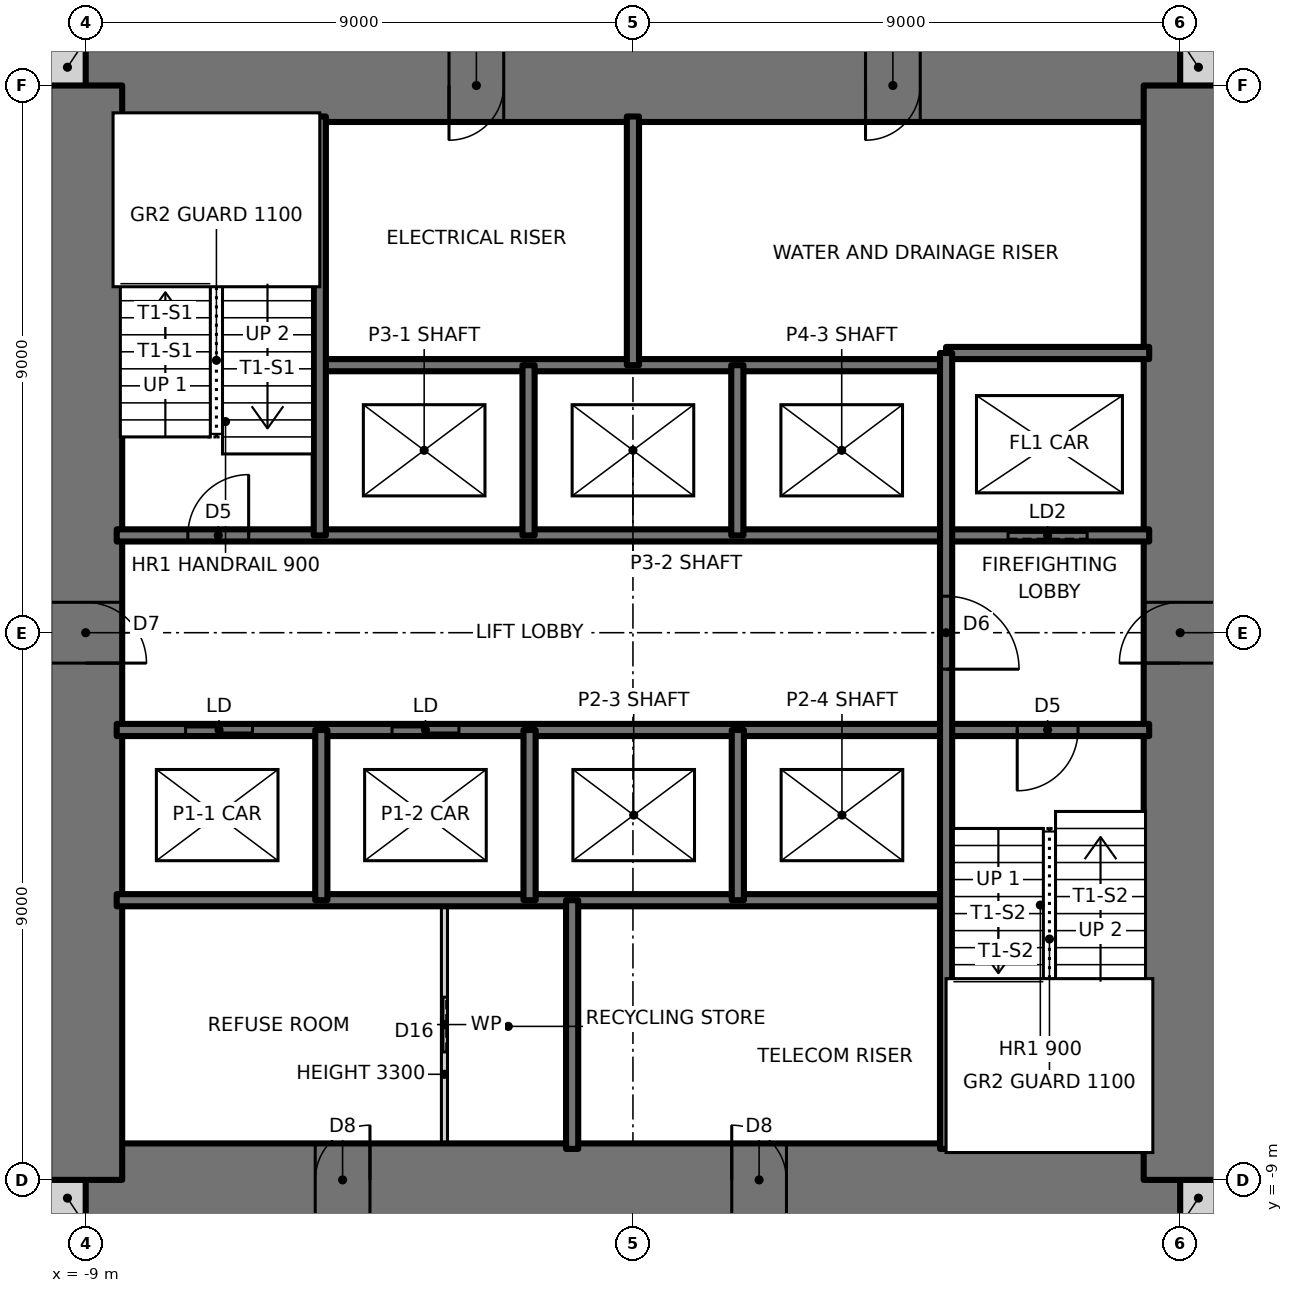
"""IFC4 building model, lengths in metres.
Left out: names, types, materials, properties, quantities, classifications, styles, units other than length and angle.
Written with IfcOpenShell. Run it as: python <this file> out.ifc"""

import sys

from ifc_helpers import new_model, si_unit, direction, frame, frame_2d, origin, place, context, subcontext, project, spatial, rectangle, extrude, element, fill, save


model = new_model("IFC4")
c1 = context("Model", 3, precision=1e-05, world=origin(), true_north=direction((0.0, 1.0)))
c2 = subcontext(c1, "Body", "Model", "MODEL_VIEW")
j1 = project(units=[si_unit("LENGTHUNIT", "METRE"), si_unit("PLANEANGLEUNIT", "RADIAN")], contexts=[c1])
p1 = place(None, origin())
s1 = spatial("IfcSite", under=j1, at=p1, CompositionType="ELEMENT")
p2 = place(p1, origin())
s2 = spatial("IfcBuilding", under=s1, at=p2, CompositionType="ELEMENT")
p3 = place(p2, frame((0.0, 0.0, 53.5)))
s3 = spatial("IfcBuildingStorey", under=s2, at=p3, CompositionType="ELEMENT", Elevation=53.5)
for number, where, z_axis, x_axis in (
    (1, (-9.6, -9.3, 0.0), (0.0, 0.0, 1.0), (1.0, 0.0, 0.0)),
    (2, (9.0, -9.3, 0.0), (0.0, 0.0, 1.0), (1.0, 0.0, 0.0)),
    (3, (9.0, 9.3, 0.0), (0.0, 0.0, 1.0), (1.0, 0.0, 0.0)),
    (4, (-9.6, 9.3, 0.0), (0.0, 0.0, 1.0), (1.0, 0.0, 0.0)),
):
    element("IfcWall", number, at=place(p3, frame(where, z_axis=z_axis, x_axis=x_axis)), inside=s3, PredefinedType="SOLIDWALL", context=c2, shape_type="SweptSolid", body=[
        extrude(rectangle(XDim=0.6, YDim=0.6, at=frame_2d((0.3, 0.0))), origin(), (0.0, 0.0, 1.0), 3.5),
    ])
p4 = place(p3, frame((-9.0, -9.0, 0.0), z_axis=(0.0, 0.0, 1.0), x_axis=(1.0, 0.0, 0.0)))
e5 = element("IfcWall", 5, at=p4, inside=s3, PredefinedType="SHEAR", context=c2, shape_type="SweptSolid", body=[
    extrude(rectangle(XDim=18.0, YDim=1.2, at=frame_2d((9.0, 0.0))), origin(), (0.0, 0.0, 1.0), 3.5),
])
p5 = place(p4, frame((3.775, 0.0, 0.0)))
e6 = element("IfcOpeningElement", 6, at=p5, cuts=e5, PredefinedType="OPENING", context=c2, shape_type="SweptSolid", body=[
    extrude(rectangle(XDim=0.9, YDim=2.1, at=frame_2d((0.45, 1.05))), frame((0.0, 0.61, 0.0), z_axis=(0.0, -1.0, 0.0), x_axis=(1.0, 0.0, 0.0)), (0.0, 0.0, 1.0), 1.22),
])
p6 = place(p4, frame((10.625, 0.0, 0.0)))
e7 = element("IfcOpeningElement", 7, at=p6, cuts=e5, PredefinedType="OPENING", context=c2, shape_type="SweptSolid", body=[
    extrude(rectangle(XDim=0.9, YDim=2.1, at=frame_2d((0.45, 1.05))), frame((0.0, 0.61, 0.0), z_axis=(0.0, -1.0, 0.0), x_axis=(1.0, 0.0, 0.0)), (0.0, 0.0, 1.0), 1.22),
])
p7 = place(p3, frame((9.0, 9.0, 0.0), z_axis=(0.0, 0.0, 1.0), x_axis=(-1.0, 0.0, 0.0)))
e8 = element("IfcWall", 8, at=p7, inside=s3, PredefinedType="SHEAR", context=c2, shape_type="SweptSolid", body=[
    extrude(rectangle(XDim=18.0, YDim=1.2, at=frame_2d((9.0, 0.0))), origin(), (0.0, 0.0, 1.0), 3.5),
])
p8 = place(p7, frame((11.125, 0.0, 0.0)))
e9 = element("IfcOpeningElement", 9, at=p8, cuts=e8, PredefinedType="OPENING", context=c2, shape_type="SweptSolid", body=[
    extrude(rectangle(XDim=0.9, YDim=2.1, at=frame_2d((0.45, 1.05))), frame((0.0, 0.61, 0.0), z_axis=(0.0, -1.0, 0.0), x_axis=(1.0, 0.0, 0.0)), (0.0, 0.0, 1.0), 1.22),
])
p9 = place(p7, frame((4.275, 0.0, 0.0)))
e10 = element("IfcOpeningElement", 10, at=p9, cuts=e8, PredefinedType="OPENING", context=c2, shape_type="SweptSolid", body=[
    extrude(rectangle(XDim=0.9, YDim=2.1, at=frame_2d((0.45, 1.05))), frame((0.0, 0.61, 0.0), z_axis=(0.0, -1.0, 0.0), x_axis=(1.0, 0.0, 0.0)), (0.0, 0.0, 1.0), 1.22),
])
p10 = place(p3, frame((9.0, -9.0, 0.0), z_axis=(0.0, 0.0, 1.0), x_axis=(0.0, 1.0, 0.0)))
e11 = element("IfcWall", 11, at=p10, inside=s3, PredefinedType="SHEAR", context=c2, shape_type="SweptSolid", body=[
    extrude(rectangle(XDim=18.0, YDim=1.2, at=frame_2d((9.0, 0.0))), origin(), (0.0, 0.0, 1.0), 3.5),
])
p11 = place(p10, frame((8.5, 0.0, 0.0)))
e12 = element("IfcOpeningElement", 12, at=p11, cuts=e11, PredefinedType="OPENING", context=c2, shape_type="SweptSolid", body=[
    extrude(rectangle(XDim=1.0, YDim=2.1, at=frame_2d((0.5, 1.05))), frame((0.0, 0.61, 0.0), z_axis=(0.0, -1.0, 0.0), x_axis=(1.0, 0.0, 0.0)), (0.0, 0.0, 1.0), 1.22),
])
p12 = place(p3, frame((-9.0, 9.0, 0.0), z_axis=(0.0, 0.0, 1.0), x_axis=(0.0, -1.0, 0.0)))
e13 = element("IfcWall", 13, at=p12, inside=s3, PredefinedType="SHEAR", context=c2, shape_type="SweptSolid", body=[
    extrude(rectangle(XDim=18.0, YDim=1.2, at=frame_2d((9.0, 0.0))), origin(), (0.0, 0.0, 1.0), 3.5),
])
p13 = place(p12, frame((8.5, 0.0, 0.0)))
e14 = element("IfcOpeningElement", 14, at=p13, cuts=e13, PredefinedType="OPENING", context=c2, shape_type="SweptSolid", body=[
    extrude(rectangle(XDim=1.0, YDim=2.1, at=frame_2d((0.5, 1.05))), frame((0.0, 0.61, 0.0), z_axis=(0.0, -1.0, 0.0), x_axis=(1.0, 0.0, 0.0)), (0.0, 0.0, 1.0), 1.22),
])
p14 = place(p3, frame((-8.49, -4.4, 0.0), z_axis=(0.0, 0.0, 1.0), x_axis=(1.0, 0.0, 0.0)))
e15 = element("IfcWall", 15, at=p14, inside=s3, PredefinedType="SOLIDWALL", context=c2, shape_type="SweptSolid", body=[
    extrude(rectangle(XDim=13.64, YDim=0.2, at=frame_2d((6.82, 0.0))), origin(), (0.0, 0.0, 1.0), 3.5),
])
p15 = place(p3, frame((-8.49, -1.6, 0.0), z_axis=(0.0, 0.0, 1.0), x_axis=(1.0, 0.0, 0.0)))
e16 = element("IfcWall", 16, at=p15, inside=s3, PredefinedType="SOLIDWALL", context=c2, shape_type="SweptSolid", body=[
    extrude(rectangle(XDim=16.98, YDim=0.2, at=frame_2d((8.49, 0.0))), origin(), (0.0, 0.0, 1.0), 3.5),
])
p16 = place(p15, frame((14.81, 0.0, 0.0)))
e17 = element("IfcOpeningElement", 17, at=p16, cuts=e16, PredefinedType="OPENING", context=c2, shape_type="SweptSolid", body=[
    extrude(rectangle(XDim=1.0, YDim=2.1, at=frame_2d((0.5, 1.05))), frame((0.0, 0.11, 0.0), z_axis=(0.0, -1.0, 0.0), x_axis=(1.0, 0.0, 0.0)), (0.0, 0.0, 1.0), 0.22),
])
p17 = place(p15, frame((1.133, 0.0, 0.0)))
e18 = element("IfcOpeningElement", 18, at=p17, cuts=e16, PredefinedType="OPENING", context=c2, shape_type="SweptSolid", body=[
    extrude(rectangle(XDim=1.1, YDim=2.1, at=frame_2d((0.55, 1.05))), frame((0.0, 0.11, 0.0), z_axis=(0.0, -1.0, 0.0), x_axis=(1.0, 0.0, 0.0)), (0.0, 0.0, 1.0), 0.22),
])
p18 = place(p15, frame((4.528, 0.0, 0.0)))
e19 = element("IfcOpeningElement", 19, at=p18, cuts=e16, PredefinedType="OPENING", context=c2, shape_type="SweptSolid", body=[
    extrude(rectangle(XDim=1.1, YDim=2.1, at=frame_2d((0.55, 1.05))), frame((0.0, 0.11, 0.0), z_axis=(0.0, -1.0, 0.0), x_axis=(1.0, 0.0, 0.0)), (0.0, 0.0, 1.0), 0.22),
])
p19 = place(p3, frame((-8.49, 1.6, 0.0), z_axis=(0.0, 0.0, 1.0), x_axis=(1.0, 0.0, 0.0)))
e20 = element("IfcWall", 20, at=p19, inside=s3, PredefinedType="SOLIDWALL", context=c2, shape_type="SweptSolid", body=[
    extrude(rectangle(XDim=16.98, YDim=0.2, at=frame_2d((8.49, 0.0))), origin(), (0.0, 0.0, 1.0), 3.5),
])
p20 = place(p19, frame((1.17, 0.0, 0.0)))
e21 = element("IfcOpeningElement", 21, at=p20, cuts=e20, PredefinedType="OPENING", context=c2, shape_type="SweptSolid", body=[
    extrude(rectangle(XDim=1.0, YDim=2.1, at=frame_2d((0.5, 1.05))), frame((0.0, 0.11, 0.0), z_axis=(0.0, -1.0, 0.0), x_axis=(1.0, 0.0, 0.0)), (0.0, 0.0, 1.0), 0.22),
])
p21 = place(p19, frame((14.66, 0.0, 0.0)))
e22 = element("IfcOpeningElement", 22, at=p21, cuts=e20, PredefinedType="OPENING", context=c2, shape_type="SweptSolid", body=[
    extrude(rectangle(XDim=1.3, YDim=2.1, at=frame_2d((0.65, 1.05))), frame((0.0, 0.11, 0.0), z_axis=(0.0, -1.0, 0.0), x_axis=(1.0, 0.0, 0.0)), (0.0, 0.0, 1.0), 0.22),
])
p22 = place(p3, frame((-5.15, 4.4, 0.0), z_axis=(0.0, 0.0, 1.0), x_axis=(1.0, 0.0, 0.0)))
e23 = element("IfcWall", 23, at=p22, inside=s3, PredefinedType="SOLIDWALL", context=c2, shape_type="SweptSolid", body=[
    extrude(rectangle(XDim=10.3, YDim=0.2, at=frame_2d((5.15, 0.0))), origin(), (0.0, 0.0, 1.0), 3.5),
])
p23 = place(p3, frame((5.15, 4.6, 0.0), z_axis=(0.0, 0.0, 1.0), x_axis=(1.0, 0.0, 0.0)))
e24 = element("IfcWall", 24, at=p23, inside=s3, PredefinedType="SOLIDWALL", context=c2, shape_type="SweptSolid", body=[
    extrude(rectangle(XDim=3.34, YDim=0.2, at=frame_2d((1.67, 0.0))), origin(), (0.0, 0.0, 1.0), 3.5),
])
p24 = place(p3, frame((5.15, -8.49, 0.0), z_axis=(0.0, 0.0, 1.0), x_axis=(0.0, 1.0, 0.0)))
e25 = element("IfcWall", 25, at=p24, inside=s3, PredefinedType="SOLIDWALL", context=c2, shape_type="SweptSolid", body=[
    extrude(rectangle(XDim=13.09, YDim=0.2, at=frame_2d((6.545, 0.0))), origin(), (0.0, 0.0, 1.0), 3.5),
])
p25 = place(p24, frame((7.89, 0.0, 0.0)))
e26 = element("IfcOpeningElement", 26, at=p25, cuts=e25, PredefinedType="OPENING", context=c2, shape_type="SweptSolid", body=[
    extrude(rectangle(XDim=1.2, YDim=2.1, at=frame_2d((0.6, 1.05))), frame((0.0, 0.11, 0.0), z_axis=(0.0, -1.0, 0.0), x_axis=(1.0, 0.0, 0.0)), (0.0, 0.0, 1.0), 0.22),
])
for number, where, z_axis, x_axis in (
    (27, (1.725, -4.4, 0.0), (0.0, 0.0, 1.0), (0.0, 1.0, 0.0)),
    (28, (1.717, 1.6, 0.0), (0.0, 0.0, 1.0), (0.0, 1.0, 0.0)),
):
    element("IfcWall", number, at=place(p3, frame(where, z_axis=z_axis, x_axis=x_axis)), inside=s3, PredefinedType="SOLIDWALL", context=c2, shape_type="SweptSolid", body=[
        extrude(rectangle(XDim=2.8, YDim=0.2, at=frame_2d((1.4, 0.0))), origin(), (0.0, 0.0, 1.0), 3.5),
    ])
for number, where, z_axis, x_axis in (
    (29, (0.0, 4.4, 0.0), (0.0, 0.0, 1.0), (0.0, 1.0, 0.0)),
    (30, (-1.0, -8.49, 0.0), (0.0, 0.0, 1.0), (0.0, 1.0, 0.0)),
):
    element("IfcWall", number, at=place(p3, frame(where, z_axis=z_axis, x_axis=x_axis)), inside=s3, PredefinedType="SOLIDWALL", context=c2, shape_type="SweptSolid", body=[
        extrude(rectangle(XDim=4.09, YDim=0.2, at=frame_2d((2.045, 0.0))), origin(), (0.0, 0.0, 1.0), 3.5),
    ])
for number, where, z_axis, x_axis in (
    (31, (-1.7, -4.4, 0.0), (0.0, 0.0, 1.0), (0.0, 1.0, 0.0)),
    (32, (-1.717, 1.6, 0.0), (0.0, 0.0, 1.0), (0.0, 1.0, 0.0)),
):
    element("IfcWall", number, at=place(p3, frame(where, z_axis=z_axis, x_axis=x_axis)), inside=s3, PredefinedType="SOLIDWALL", context=c2, shape_type="SweptSolid", body=[
        extrude(rectangle(XDim=2.8, YDim=0.2, at=frame_2d((1.4, 0.0))), origin(), (0.0, 0.0, 1.0), 3.5),
    ])
p26 = place(p3, frame((-3.1, -8.49, 0.0), z_axis=(0.0, 0.0, 1.0), x_axis=(0.0, 1.0, 0.0)))
e33 = element("IfcWall", 33, at=p26, inside=s3, PredefinedType="PARTITIONING", context=c2, shape_type="SweptSolid", body=[
    extrude(rectangle(XDim=4.09, YDim=0.1, at=frame_2d((2.045, 0.0))), origin(), (0.0, 0.0, 1.0), 3.3),
])
p27 = place(p26, frame((1.595, 0.0, 0.0)))
e34 = element("IfcOpeningElement", 34, at=p27, cuts=e33, PredefinedType="OPENING", context=c2, shape_type="SweptSolid", body=[
    extrude(rectangle(XDim=0.9, YDim=2.1, at=frame_2d((0.45, 1.05))), frame((0.0, 0.06, 0.0), z_axis=(0.0, -1.0, 0.0), x_axis=(1.0, 0.0, 0.0)), (0.0, 0.0, 1.0), 0.12),
])
p28 = place(p3, frame((-5.125, -4.4, 0.0), z_axis=(0.0, 0.0, 1.0), x_axis=(0.0, 1.0, 0.0)))
e35 = element("IfcWall", 35, at=p28, inside=s3, PredefinedType="SOLIDWALL", context=c2, shape_type="SweptSolid", body=[
    extrude(rectangle(XDim=2.8, YDim=0.2, at=frame_2d((1.4, 0.0))), origin(), (0.0, 0.0, 1.0), 3.5),
])
p29 = place(p3, frame((-5.15, 1.6, 0.0), z_axis=(0.0, 0.0, 1.0), x_axis=(0.0, 1.0, 0.0)))
e36 = element("IfcWall", 36, at=p29, inside=s3, PredefinedType="SOLIDWALL", context=c2, shape_type="SweptSolid", body=[
    extrude(rectangle(XDim=6.89, YDim=0.2, at=frame_2d((3.445, 0.0))), origin(), (0.0, 0.0, 1.0), 3.5),
])
p30 = place(p20, origin())
e37 = element("IfcDoor", 37, at=p30, inside=s3, OperationType="SINGLE_SWING_RIGHT", PredefinedType="DOOR", context=c2, shape_type="SweptSolid", body=[
    extrude(rectangle(XDim=1.0, YDim=2.1, at=frame_2d((0.5, 1.05))), frame((0.0, 0.025, 0.0), z_axis=(0.0, -1.0, 0.0), x_axis=(1.0, 0.0, 0.0)), (0.0, 0.0, 1.0), 0.05),
])
fill(e21, e37)
p31 = place(p16, frame((1.0, 0.0, 0.0), z_axis=(0.0, 0.0, 1.0), x_axis=(-1.0, 0.0, 0.0)))
e38 = element("IfcDoor", 38, at=p31, inside=s3, OperationType="SINGLE_SWING_RIGHT", PredefinedType="DOOR", context=c2, shape_type="SweptSolid", body=[
    extrude(rectangle(XDim=1.0, YDim=2.1, at=frame_2d((0.5, 1.05))), frame((0.0, 0.025, 0.0), z_axis=(0.0, -1.0, 0.0), x_axis=(1.0, 0.0, 0.0)), (0.0, 0.0, 1.0), 0.05),
])
fill(e17, e38)
p32 = place(p25, frame((1.2, 0.0, 0.0), z_axis=(0.0, 0.0, 1.0), x_axis=(-1.0, 0.0, 0.0)))
e39 = element("IfcDoor", 39, at=p32, inside=s3, OperationType="SINGLE_SWING_RIGHT", PredefinedType="DOOR", context=c2, shape_type="SweptSolid", body=[
    extrude(rectangle(XDim=1.2, YDim=2.1, at=frame_2d((0.6, 1.05))), frame((0.0, 0.025, 0.0), z_axis=(0.0, -1.0, 0.0), x_axis=(1.0, 0.0, 0.0)), (0.0, 0.0, 1.0), 0.05),
])
fill(e26, e39)
p33 = place(p27, origin())
e40 = element("IfcDoor", 40, at=p33, inside=s3, OperationType="SLIDING_TO_LEFT", PredefinedType="DOOR", context=c2, shape_type="SweptSolid", body=[
    extrude(rectangle(XDim=0.9, YDim=2.1, at=frame_2d((0.45, 1.05))), frame((0.0, 0.025, 0.0), z_axis=(0.0, -1.0, 0.0), x_axis=(1.0, 0.0, 0.0)), (0.0, 0.0, 1.0), 0.05),
])
fill(e34, e40)
p34 = place(p13, origin())
e41 = element("IfcDoor", 41, at=p34, inside=s3, OperationType="SINGLE_SWING_RIGHT", PredefinedType="DOOR", context=c2, shape_type="SweptSolid", body=[
    extrude(rectangle(XDim=1.0, YDim=2.1, at=frame_2d((0.5, 1.05))), frame((0.0, 0.025, 0.0), z_axis=(0.0, -1.0, 0.0), x_axis=(1.0, 0.0, 0.0)), (0.0, 0.0, 1.0), 0.05),
])
fill(e14, e41)
p35 = place(p11, origin())
e42 = element("IfcDoor", 42, at=p35, inside=s3, OperationType="SINGLE_SWING_LEFT", PredefinedType="DOOR", context=c2, shape_type="SweptSolid", body=[
    extrude(rectangle(XDim=1.0, YDim=2.1, at=frame_2d((0.5, 1.05))), frame((0.0, 0.025, 0.0), z_axis=(0.0, -1.0, 0.0), x_axis=(1.0, 0.0, 0.0)), (0.0, 0.0, 1.0), 0.05),
])
fill(e12, e42)
p36 = place(p8, origin())
e43 = element("IfcDoor", 43, at=p36, inside=s3, OperationType="SINGLE_SWING_RIGHT", PredefinedType="DOOR", context=c2, shape_type="SweptSolid", body=[
    extrude(rectangle(XDim=0.9, YDim=2.1, at=frame_2d((0.45, 1.05))), frame((0.0, 0.025, 0.0), z_axis=(0.0, -1.0, 0.0), x_axis=(1.0, 0.0, 0.0)), (0.0, 0.0, 1.0), 0.05),
])
fill(e9, e43)
p37 = place(p9, origin())
e44 = element("IfcDoor", 44, at=p37, inside=s3, OperationType="SINGLE_SWING_RIGHT", PredefinedType="DOOR", context=c2, shape_type="SweptSolid", body=[
    extrude(rectangle(XDim=0.9, YDim=2.1, at=frame_2d((0.45, 1.05))), frame((0.0, 0.025, 0.0), z_axis=(0.0, -1.0, 0.0), x_axis=(1.0, 0.0, 0.0)), (0.0, 0.0, 1.0), 0.05),
])
fill(e10, e44)
p38 = place(p5, origin())
e45 = element("IfcDoor", 45, at=p38, inside=s3, OperationType="SINGLE_SWING_RIGHT", PredefinedType="DOOR", context=c2, shape_type="SweptSolid", body=[
    extrude(rectangle(XDim=0.9, YDim=2.1, at=frame_2d((0.45, 1.05))), frame((0.0, 0.025, 0.0), z_axis=(0.0, -1.0, 0.0), x_axis=(1.0, 0.0, 0.0)), (0.0, 0.0, 1.0), 0.05),
])
fill(e6, e45)
p39 = place(p6, origin())
e46 = element("IfcDoor", 46, at=p39, inside=s3, OperationType="SINGLE_SWING_LEFT", PredefinedType="DOOR", context=c2, shape_type="SweptSolid", body=[
    extrude(rectangle(XDim=0.9, YDim=2.1, at=frame_2d((0.45, 1.05))), frame((0.0, 0.025, 0.0), z_axis=(0.0, -1.0, 0.0), x_axis=(1.0, 0.0, 0.0)), (0.0, 0.0, 1.0), 0.05),
])
fill(e7, e46)
p40 = place(p17, origin())
e47 = element("IfcDoor", 47, at=p40, inside=s3, OperationType="DOUBLE_DOOR_SLIDING", PredefinedType="DOOR", context=c2, shape_type="SweptSolid", body=[
    extrude(rectangle(XDim=1.1, YDim=2.1, at=frame_2d((0.55, 1.05))), frame((0.0, 0.025, 0.0), z_axis=(0.0, -1.0, 0.0), x_axis=(1.0, 0.0, 0.0)), (0.0, 0.0, 1.0), 0.05),
])
fill(e18, e47)
p41 = place(p18, origin())
e48 = element("IfcDoor", 48, at=p41, inside=s3, OperationType="DOUBLE_DOOR_SLIDING", PredefinedType="DOOR", context=c2, shape_type="SweptSolid", body=[
    extrude(rectangle(XDim=1.1, YDim=2.1, at=frame_2d((0.55, 1.05))), frame((0.0, 0.025, 0.0), z_axis=(0.0, -1.0, 0.0), x_axis=(1.0, 0.0, 0.0)), (0.0, 0.0, 1.0), 0.05),
])
fill(e19, e48)
p42 = place(p21, origin())
e49 = element("IfcDoor", 49, at=p42, inside=s3, OperationType="SLIDING_TO_LEFT", PredefinedType="DOOR", context=c2, shape_type="SweptSolid", body=[
    extrude(rectangle(XDim=1.3, YDim=2.1, at=frame_2d((0.65, 1.05))), frame((0.0, 0.025, 0.0), z_axis=(0.0, -1.0, 0.0), x_axis=(1.0, 0.0, 0.0)), (0.0, 0.0, 1.0), 0.05),
])
fill(e22, e49)
save(model, sys.argv[1])
